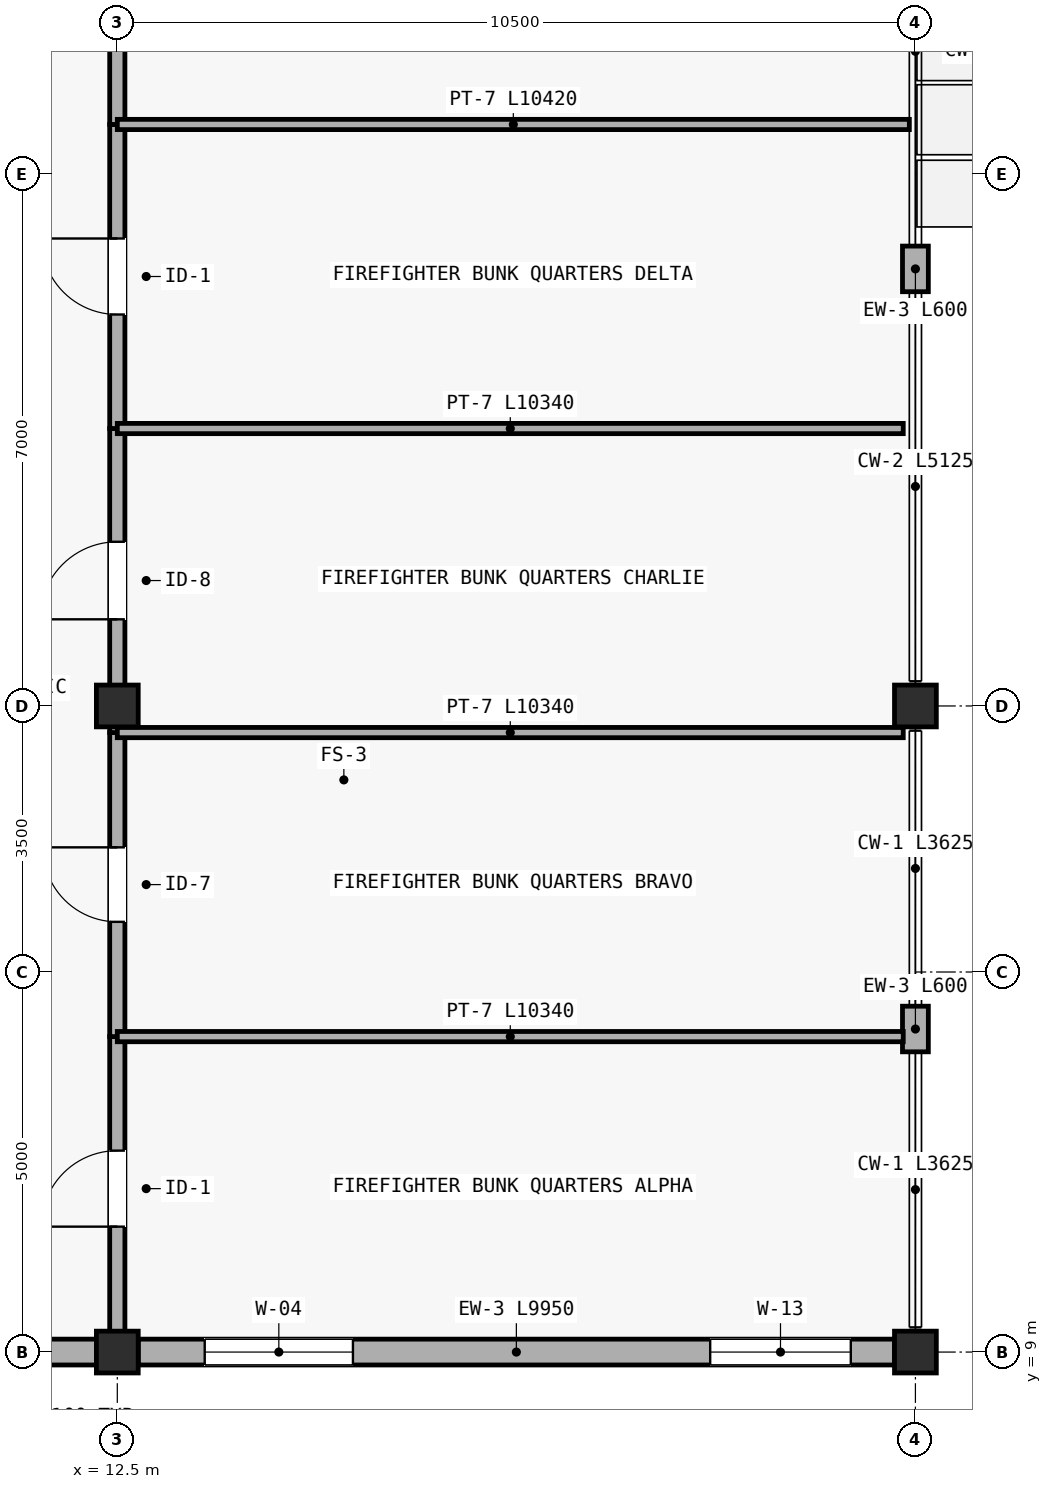
"""IFC4 building model, lengths in metres.
Left out: names, types, materials, properties, quantities, classifications, styles, units other than length and angle.
Written with IfcOpenShell. Run it as: python <this file> out.ifc"""

import sys

from ifc_helpers import new_model, si_unit, direction, frame, frame_2d, origin, origin_2d, place, context, subcontext, project, spatial, rectangle, extrude, element, fill, save


model = new_model("IFC4")
c1 = context("Model", 3, precision=1e-05, world=origin(), true_north=direction((0.0, 1.0)))
c2 = subcontext(c1, "Body", "Model", "MODEL_VIEW")
j1 = project(units=[si_unit("LENGTHUNIT", "METRE"), si_unit("PLANEANGLEUNIT", "RADIAN")], contexts=[c1])
p1 = place(None, origin())
s1 = spatial("IfcSite", under=j1, at=p1, CompositionType="ELEMENT")
p2 = place(p1, origin())
s2 = spatial("IfcBuilding", under=s1, at=p2, CompositionType="ELEMENT")
p3 = place(p2, frame((0.0, 0.0, 9.3)))
s3 = spatial("IfcBuildingStorey", under=s2, at=p3, CompositionType="ELEMENT", Elevation=9.3)
for number, where, z_axis, x_axis in (
    (1, (12.5, 9.0, 0.0), (0.0, 0.0, 1.0), (1.0, 0.0, 0.0)),
    (2, (12.5, 17.5, 0.0), (0.0, 0.0, 1.0), (1.0, 0.0, 0.0)),
    (3, (23.0, 9.0, 0.0), (0.0, 0.0, 1.0), (1.0, 0.0, 0.0)),
    (4, (23.0, 17.5, 0.0), (0.0, 0.0, 1.0), (1.0, 0.0, 0.0)),
):
    element("IfcColumn", number, at=place(p3, frame(where, z_axis=z_axis, x_axis=x_axis)), inside=s3, PredefinedType="COLUMN", context=c2, shape_type="SweptSolid", body=[
        extrude(rectangle(XDim=0.55, YDim=0.55, at=origin_2d()), origin(), (0.0, 0.0, 1.0), 3.45),
    ])
p4 = place(p3, frame((8.775, 9.0, 0.0), z_axis=(0.0, 0.0, 1.0), x_axis=(1.0, 0.0, 0.0)))
e5 = element("IfcWall", 5, at=p4, inside=s3, PredefinedType="STANDARD", context=c2, shape_type="SweptSolid", body=[
    extrude(rectangle(XDim=3.45, YDim=0.34, at=frame_2d((1.725, 0.0))), origin(), (0.0, 0.0, 1.0), 2.75),
])
p5 = place(p4, frame((0.875, 0.0, 0.75)))
e6 = element("IfcOpeningElement", 6, at=p5, cuts=e5, PredefinedType="OPENING", context=c2, shape_type="SweptSolid", body=[
    extrude(rectangle(XDim=1.95, YDim=1.35, at=frame_2d((0.975, 0.675))), frame((0.0, 0.18, 0.0), z_axis=(0.0, -1.0, 0.0), x_axis=(1.0, 0.0, 0.0)), (0.0, 0.0, 1.0), 0.36),
])
p6 = place(p3, frame((12.775, 9.0, 0.0), z_axis=(0.0, 0.0, 1.0), x_axis=(1.0, 0.0, 0.0)))
e7 = element("IfcWall", 7, at=p6, inside=s3, PredefinedType="STANDARD", context=c2, shape_type="SweptSolid", body=[
    extrude(rectangle(XDim=9.95, YDim=0.34, at=frame_2d((4.975, 0.0))), origin(), (0.0, 0.0, 1.0), 2.75),
])
p7 = place(p6, frame((0.875, 0.0, 0.75)))
e8 = element("IfcOpeningElement", 8, at=p7, cuts=e7, PredefinedType="OPENING", context=c2, shape_type="SweptSolid", body=[
    extrude(rectangle(XDim=1.95, YDim=1.35, at=frame_2d((0.975, 0.675))), frame((0.0, 0.18, 0.0), z_axis=(0.0, -1.0, 0.0), x_axis=(1.0, 0.0, 0.0)), (0.0, 0.0, 1.0), 0.36),
])
p8 = place(p6, frame((7.525, 0.0, 0.75)))
e9 = element("IfcOpeningElement", 9, at=p8, cuts=e7, PredefinedType="OPENING", context=c2, shape_type="SweptSolid", body=[
    extrude(rectangle(XDim=1.85, YDim=1.3, at=frame_2d((0.925, 0.65))), frame((0.0, 0.18, 0.0), z_axis=(0.0, -1.0, 0.0), x_axis=(1.0, 0.0, 0.0)), (0.0, 0.0, 1.0), 0.36),
])
for number, where, z_axis, x_axis in (
    (10, (23.0, 12.95, 0.0), (0.0, 0.0, 1.0), (0.0, 1.0, 0.0)),
    (11, (23.0, 22.95, 0.0), (0.0, 0.0, 1.0), (0.0, 1.0, 0.0)),
):
    element("IfcWall", number, at=place(p3, frame(where, z_axis=z_axis, x_axis=x_axis)), inside=s3, PredefinedType="STANDARD", context=c2, shape_type="SweptSolid", body=[
        extrude(rectangle(XDim=0.6, YDim=0.34, at=frame_2d((0.3, 0.0))), origin(), (0.0, 0.0, 1.0), 2.75),
    ])
p9 = place(p3, frame((12.5, 9.15, 0.0), z_axis=(0.0, 0.0, 1.0), x_axis=(0.0, 1.0, 0.0)))
e12 = element("IfcWall", 12, at=p9, inside=s3, PredefinedType="PARTITIONING", context=c2, shape_type="SweptSolid", body=[
    extrude(rectangle(XDim=4.0, YDim=0.2, at=frame_2d((2.0, 0.0))), origin(), (0.0, 0.0, 1.0), 2.7),
])
p10 = place(p9, frame((1.5, 0.0, 0.0)))
e13 = element("IfcOpeningElement", 13, at=p10, cuts=e12, PredefinedType="OPENING", context=c2, shape_type="SweptSolid", body=[
    extrude(rectangle(XDim=1.0, YDim=2.12, at=frame_2d((0.5, 1.06))), frame((0.0, 0.11, 0.0), z_axis=(0.0, -1.0, 0.0), x_axis=(1.0, 0.0, 0.0)), (0.0, 0.0, 1.0), 0.22),
])
p11 = place(p3, frame((12.5, 13.15, 0.0), z_axis=(0.0, 0.0, 1.0), x_axis=(0.0, 1.0, 0.0)))
e14 = element("IfcWall", 14, at=p11, inside=s3, PredefinedType="PARTITIONING", context=c2, shape_type="SweptSolid", body=[
    extrude(rectangle(XDim=4.0, YDim=0.2, at=frame_2d((2.0, 0.0))), origin(), (0.0, 0.0, 1.0), 2.7),
])
p12 = place(p11, frame((1.51, 0.0, 0.0)))
e15 = element("IfcOpeningElement", 15, at=p12, cuts=e14, PredefinedType="OPENING", context=c2, shape_type="SweptSolid", body=[
    extrude(rectangle(XDim=0.98, YDim=2.12, at=frame_2d((0.49, 1.06))), frame((0.0, 0.11, 0.0), z_axis=(0.0, -1.0, 0.0), x_axis=(1.0, 0.0, 0.0)), (0.0, 0.0, 1.0), 0.22),
])
p13 = place(p3, frame((12.5, 17.15, 0.0), z_axis=(0.0, 0.0, 1.0), x_axis=(0.0, 1.0, 0.0)))
e16 = element("IfcWall", 16, at=p13, inside=s3, PredefinedType="PARTITIONING", context=c2, shape_type="SweptSolid", body=[
    extrude(rectangle(XDim=4.0, YDim=0.2, at=frame_2d((2.0, 0.0))), origin(), (0.0, 0.0, 1.0), 2.7),
])
p14 = place(p13, frame((1.49, 0.0, 0.0)))
e17 = element("IfcOpeningElement", 17, at=p14, cuts=e16, PredefinedType="OPENING", context=c2, shape_type="SweptSolid", body=[
    extrude(rectangle(XDim=1.02, YDim=2.14, at=frame_2d((0.51, 1.07))), frame((0.0, 0.11, 0.0), z_axis=(0.0, -1.0, 0.0), x_axis=(1.0, 0.0, 0.0)), (0.0, 0.0, 1.0), 0.22),
])
p15 = place(p3, frame((12.5, 21.15, 0.0), z_axis=(0.0, 0.0, 1.0), x_axis=(0.0, 1.0, 0.0)))
e18 = element("IfcWall", 18, at=p15, inside=s3, PredefinedType="PARTITIONING", context=c2, shape_type="SweptSolid", body=[
    extrude(rectangle(XDim=4.0, YDim=0.2, at=frame_2d((2.0, 0.0))), origin(), (0.0, 0.0, 1.0), 2.7),
])
p16 = place(p15, frame((1.5, 0.0, 0.0)))
e19 = element("IfcOpeningElement", 19, at=p16, cuts=e18, PredefinedType="OPENING", context=c2, shape_type="SweptSolid", body=[
    extrude(rectangle(XDim=1.0, YDim=2.12, at=frame_2d((0.5, 1.06))), frame((0.0, 0.11, 0.0), z_axis=(0.0, -1.0, 0.0), x_axis=(1.0, 0.0, 0.0)), (0.0, 0.0, 1.0), 0.22),
])
p17 = place(p3, frame((12.5, 25.15, 0.0), z_axis=(0.0, 0.0, 1.0), x_axis=(0.0, 1.0, 0.0)))
e20 = element("IfcWall", 20, at=p17, inside=s3, PredefinedType="PARTITIONING", context=c2, shape_type="SweptSolid", body=[
    extrude(rectangle(XDim=3.85, YDim=0.2, at=frame_2d((1.925, 0.0))), origin(), (0.0, 0.0, 1.0), 2.7),
])
p18 = place(p17, frame((1.435, 0.0, 0.0)))
e21 = element("IfcOpeningElement", 21, at=p18, cuts=e20, PredefinedType="OPENING", context=c2, shape_type="SweptSolid", body=[
    extrude(rectangle(XDim=0.98, YDim=2.12, at=frame_2d((0.49, 1.06))), frame((0.0, 0.11, 0.0), z_axis=(0.0, -1.0, 0.0), x_axis=(1.0, 0.0, 0.0)), (0.0, 0.0, 1.0), 0.22),
])
for number, where, z_axis, x_axis in (
    (22, (12.5, 13.15, 0.0), (0.0, 0.0, 1.0), (1.0, 0.0, 0.0)),
    (23, (12.5, 17.15, 0.0), (0.0, 0.0, 1.0), (1.0, 0.0, 0.0)),
    (24, (12.5, 21.15, 0.0), (0.0, 0.0, 1.0), (1.0, 0.0, 0.0)),
):
    element("IfcWall", number, at=place(p3, frame(where, z_axis=z_axis, x_axis=x_axis)), inside=s3, PredefinedType="PARTITIONING", context=c2, shape_type="SweptSolid", body=[
        extrude(rectangle(XDim=10.34, YDim=0.135, at=frame_2d((5.17, 0.0))), origin(), (0.0, 0.0, 1.0), 2.7),
    ])
p19 = place(p3, frame((12.5, 25.15, 0.0), z_axis=(0.0, 0.0, 1.0), x_axis=(1.0, 0.0, 0.0)))
e25 = element("IfcWall", 25, at=p19, inside=s3, PredefinedType="PARTITIONING", context=c2, shape_type="SweptSolid", body=[
    extrude(rectangle(XDim=10.42, YDim=0.135, at=frame_2d((5.21, 0.0))), origin(), (0.0, 0.0, 1.0), 2.7),
])
p20 = place(p7, origin())
e26 = element("IfcWindow", 26, at=p20, inside=s3, PartitioningType="DOUBLE_PANEL_HORIZONTAL", PredefinedType="WINDOW", context=c2, shape_type="SweptSolid", body=[
    extrude(rectangle(XDim=1.95, YDim=1.35, at=frame_2d((0.975, 0.675))), frame((0.0, 0.03, 0.0), z_axis=(0.0, -1.0, 0.0), x_axis=(1.0, 0.0, 0.0)), (0.0, 0.0, 1.0), 0.06),
])
fill(e8, e26)
p21 = place(p8, origin())
e27 = element("IfcWindow", 27, at=p21, inside=s3, PartitioningType="DOUBLE_PANEL_HORIZONTAL", PredefinedType="WINDOW", context=c2, shape_type="SweptSolid", body=[
    extrude(rectangle(XDim=1.85, YDim=1.3, at=frame_2d((0.925, 0.65))), frame((0.0, 0.03, 0.0), z_axis=(0.0, -1.0, 0.0), x_axis=(1.0, 0.0, 0.0)), (0.0, 0.0, 1.0), 0.06),
])
fill(e9, e27)
p22 = place(p10, origin())
e28 = element("IfcDoor", 28, at=p22, inside=s3, OperationType="SINGLE_SWING_LEFT", PredefinedType="DOOR", context=c2, shape_type="SweptSolid", body=[
    extrude(rectangle(XDim=1.0, YDim=2.12, at=frame_2d((0.5, 1.06))), frame((0.0, 0.025, 0.0), z_axis=(0.0, -1.0, 0.0), x_axis=(1.0, 0.0, 0.0)), (0.0, 0.0, 1.0), 0.05),
])
fill(e13, e28)
p23 = place(p12, origin())
e29 = element("IfcDoor", 29, at=p23, inside=s3, OperationType="SINGLE_SWING_RIGHT", PredefinedType="DOOR", context=c2, shape_type="SweptSolid", body=[
    extrude(rectangle(XDim=0.98, YDim=2.12, at=frame_2d((0.49, 1.06))), frame((0.0, 0.025, 0.0), z_axis=(0.0, -1.0, 0.0), x_axis=(1.0, 0.0, 0.0)), (0.0, 0.0, 1.0), 0.05),
])
fill(e15, e29)
p24 = place(p14, origin())
e30 = element("IfcDoor", 30, at=p24, inside=s3, OperationType="SINGLE_SWING_LEFT", PredefinedType="DOOR", context=c2, shape_type="SweptSolid", body=[
    extrude(rectangle(XDim=1.02, YDim=2.14, at=frame_2d((0.51, 1.07))), frame((0.0, 0.025, 0.0), z_axis=(0.0, -1.0, 0.0), x_axis=(1.0, 0.0, 0.0)), (0.0, 0.0, 1.0), 0.05),
])
fill(e17, e30)
p25 = place(p16, origin())
e31 = element("IfcDoor", 31, at=p25, inside=s3, OperationType="SINGLE_SWING_RIGHT", PredefinedType="DOOR", context=c2, shape_type="SweptSolid", body=[
    extrude(rectangle(XDim=1.0, YDim=2.12, at=frame_2d((0.5, 1.06))), frame((0.0, 0.025, 0.0), z_axis=(0.0, -1.0, 0.0), x_axis=(1.0, 0.0, 0.0)), (0.0, 0.0, 1.0), 0.05),
])
fill(e19, e31)
save(model, sys.argv[1])
